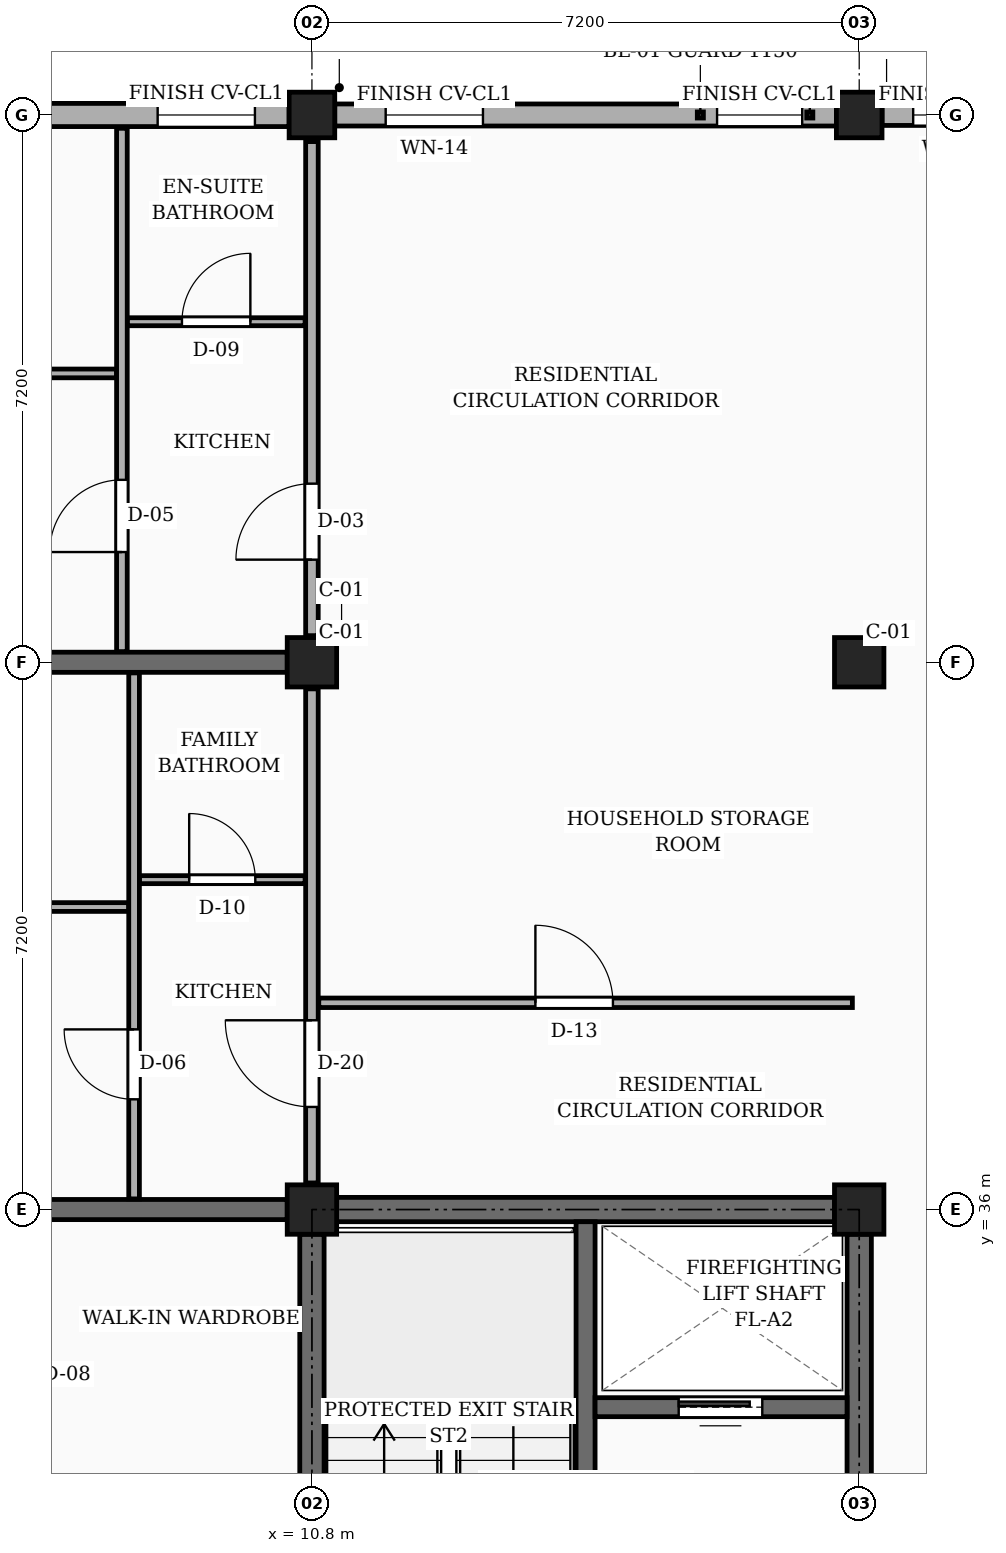
"""IFC4 building model, lengths in metres.
Left out: names, types, materials, properties, quantities, classifications, styles, units other than length and angle.
Written with IfcOpenShell. Run it as: python <this file> out.ifc"""

import sys

from ifc_helpers import new_model, si_unit, direction, frame, frame_2d, origin, origin_2d, place, context, subcontext, project, spatial, rectangle, extrude, element, fill, save


model = new_model("IFC4")
c1 = context("Model", 3, precision=1e-05, world=origin(), true_north=direction((0.0, 1.0)))
c2 = subcontext(c1, "Body", "Model", "MODEL_VIEW")
j1 = project(units=[si_unit("LENGTHUNIT", "METRE"), si_unit("PLANEANGLEUNIT", "RADIAN")], contexts=[c1])
p1 = place(None, origin())
s1 = spatial("IfcSite", under=j1, at=p1, CompositionType="ELEMENT")
p2 = place(p1, origin())
s2 = spatial("IfcBuilding", under=s1, at=p2, CompositionType="ELEMENT")
p3 = place(p2, frame((0.0, 0.0, 7.65)))
s3 = spatial("IfcBuildingStorey", under=s2, at=p3, CompositionType="ELEMENT", Elevation=7.65)
for number, where, z_axis, x_axis in (
    (1, (10.8, 36.0, 0.0), (0.0, 0.0, 1.0), (1.0, 0.0, 0.0)),
    (2, (10.8, 43.2, 0.0), (0.0, 0.0, 1.0), (1.0, 0.0, 0.0)),
):
    element("IfcColumn", number, at=place(p3, frame(where, z_axis=z_axis, x_axis=x_axis)), inside=s3, PredefinedType="COLUMN", context=c2, shape_type="SweptSolid", body=[
        extrude(rectangle(XDim=0.65, YDim=0.65, at=origin_2d()), origin(), (0.0, 0.0, 1.0), 3.15),
    ])
p4 = place(p3, frame((10.8, 50.4, 0.0), z_axis=(0.0, 0.0, 1.0), x_axis=(1.0, 0.0, 0.0)))
e3 = element("IfcColumn", 3, at=p4, inside=s3, PredefinedType="COLUMN", context=c2, shape_type="SweptSolid", body=[
    extrude(rectangle(XDim=0.6, YDim=0.6, at=origin_2d()), origin(), (0.0, 0.0, 1.0), 3.15),
])
for number, where, z_axis, x_axis in (
    (4, (18.0, 36.0, 0.0), (0.0, 0.0, 1.0), (1.0, 0.0, 0.0)),
    (5, (18.0, 43.2, 0.0), (0.0, 0.0, 1.0), (1.0, 0.0, 0.0)),
):
    element("IfcColumn", number, at=place(p3, frame(where, z_axis=z_axis, x_axis=x_axis)), inside=s3, PredefinedType="COLUMN", context=c2, shape_type="SweptSolid", body=[
        extrude(rectangle(XDim=0.65, YDim=0.65, at=origin_2d()), origin(), (0.0, 0.0, 1.0), 3.15),
    ])
p5 = place(p3, frame((18.0, 50.4, 0.0), z_axis=(0.0, 0.0, 1.0), x_axis=(1.0, 0.0, 0.0)))
e6 = element("IfcColumn", 6, at=p5, inside=s3, PredefinedType="COLUMN", context=c2, shape_type="SweptSolid", body=[
    extrude(rectangle(XDim=0.6, YDim=0.6, at=origin_2d()), origin(), (0.0, 0.0, 1.0), 3.15),
])
for number, where, z_axis, x_axis in (
    (7, (3.9, 36.0, 0.0), (0.0, 0.0, 1.0), (1.0, 0.0, 0.0)),
    (8, (3.9, 43.2, 0.0), (0.0, 0.0, 1.0), (1.0, 0.0, 0.0)),
):
    element("IfcWall", number, at=place(p3, frame(where, z_axis=z_axis, x_axis=x_axis)), inside=s3, PredefinedType="SOLIDWALL", context=c2, shape_type="SweptSolid", body=[
        extrude(rectangle(XDim=6.575, YDim=0.265, at=frame_2d((3.288, 0.0))), origin(), (0.0, 0.0, 1.0), 2.17),
    ])
p6 = place(p3, frame((24.9, 50.4, 0.0), z_axis=(0.0, 0.0, 1.0), x_axis=(-1.0, 0.0, 0.0)))
e9 = element("IfcWall", 9, at=p6, inside=s3, PredefinedType="SOLIDWALL", context=c2, shape_type="SweptSolid", body=[
    extrude(rectangle(XDim=6.6, YDim=0.275, at=frame_2d((3.3, 0.0))), origin(), (0.0, 0.0, 1.0), 2.44),
])
p7 = place(p6, frame((2.115, 0.0, 0.78)))
e10 = element("IfcOpeningElement", 10, at=p7, cuts=e9, PredefinedType="OPENING", context=c2, shape_type="SweptSolid", body=[
    extrude(rectangle(XDim=0.96, YDim=1.26, at=frame_2d((0.48, 0.63))), frame((0.0, 0.147, 0.0), z_axis=(0.0, -1.0, 0.0), x_axis=(1.0, 0.0, 0.0)), (0.0, 0.0, 1.0), 0.295),
])
p8 = place(p6, frame((5.07, 0.0, 0.78)))
e11 = element("IfcOpeningElement", 11, at=p8, cuts=e9, PredefinedType="OPENING", context=c2, shape_type="SweptSolid", body=[
    extrude(rectangle(XDim=1.12, YDim=1.26, at=frame_2d((0.56, 0.63))), frame((0.0, 0.147, 0.0), z_axis=(0.0, -1.0, 0.0), x_axis=(1.0, 0.0, 0.0)), (0.0, 0.0, 1.0), 0.295),
])
p9 = place(p3, frame((17.7, 50.4, 0.0), z_axis=(0.0, 0.0, 1.0), x_axis=(-1.0, 0.0, 0.0)))
e12 = element("IfcWall", 12, at=p9, inside=s3, PredefinedType="SOLIDWALL", context=c2, shape_type="SweptSolid", body=[
    extrude(rectangle(XDim=6.6, YDim=0.29, at=frame_2d((3.3, 0.0))), origin(), (0.0, 0.0, 1.0), 2.44),
])
p10 = place(p9, frame((0.45, 0.0, 0.78)))
e13 = element("IfcOpeningElement", 13, at=p10, cuts=e12, PredefinedType="OPENING", context=c2, shape_type="SweptSolid", body=[
    extrude(rectangle(XDim=1.12, YDim=1.26, at=frame_2d((0.56, 0.63))), frame((0.0, 0.155, 0.0), z_axis=(0.0, -1.0, 0.0), x_axis=(1.0, 0.0, 0.0)), (0.0, 0.0, 1.0), 0.31),
])
p11 = place(p9, frame((4.65, 0.0, 0.78)))
e14 = element("IfcOpeningElement", 14, at=p11, cuts=e12, PredefinedType="OPENING", context=c2, shape_type="SweptSolid", body=[
    extrude(rectangle(XDim=1.28, YDim=1.26, at=frame_2d((0.64, 0.63))), frame((0.0, 0.155, 0.0), z_axis=(0.0, -1.0, 0.0), x_axis=(1.0, 0.0, 0.0)), (0.0, 0.0, 1.0), 0.31),
])
p12 = place(p3, frame((10.5, 50.4, 0.0), z_axis=(0.0, 0.0, 1.0), x_axis=(-1.0, 0.0, 0.0)))
e15 = element("IfcWall", 15, at=p12, inside=s3, PredefinedType="SOLIDWALL", context=c2, shape_type="SweptSolid", body=[
    extrude(rectangle(XDim=6.6, YDim=0.305, at=frame_2d((3.3, 0.0))), origin(), (0.0, 0.0, 1.0), 2.44),
])
p13 = place(p12, frame((0.45, 0.0, 0.78)))
e16 = element("IfcOpeningElement", 16, at=p13, cuts=e15, PredefinedType="OPENING", context=c2, shape_type="SweptSolid", body=[
    extrude(rectangle(XDim=1.28, YDim=1.26, at=frame_2d((0.64, 0.63))), frame((0.0, 0.163, 0.0), z_axis=(0.0, -1.0, 0.0), x_axis=(1.0, 0.0, 0.0)), (0.0, 0.0, 1.0), 0.325),
])
p14 = place(p12, frame((4.65, 0.0, 0.78)))
e17 = element("IfcOpeningElement", 17, at=p14, cuts=e15, PredefinedType="OPENING", context=c2, shape_type="SweptSolid", body=[
    extrude(rectangle(XDim=1.44, YDim=1.26, at=frame_2d((0.72, 0.63))), frame((0.0, 0.163, 0.0), z_axis=(0.0, -1.0, 0.0), x_axis=(1.0, 0.0, 0.0)), (0.0, 0.0, 1.0), 0.325),
])
for number, where, z_axis, x_axis in (
    (18, (10.8, 29.125, 0.0), (0.0, 0.0, 1.0), (0.0, 1.0, 0.0)),
    (19, (11.125, 36.0, 0.0), (0.0, 0.0, 1.0), (1.0, 0.0, 0.0)),
):
    element("IfcWall", number, at=place(p3, frame(where, z_axis=z_axis, x_axis=x_axis)), inside=s3, PredefinedType="SHEAR", context=c2, shape_type="SweptSolid", body=[
        extrude(rectangle(XDim=6.55, YDim=0.32, at=frame_2d((3.275, 0.0))), origin(), (0.0, 0.0, 1.0), 2.87),
    ])
p15 = place(p3, frame((18.0, 29.125, 0.0), z_axis=(0.0, 0.0, 1.0), x_axis=(0.0, 1.0, 0.0)))
e20 = element("IfcWall", 20, at=p15, inside=s3, PredefinedType="SHEAR", context=c2, shape_type="SweptSolid", body=[
    extrude(rectangle(XDim=6.55, YDim=0.32, at=frame_2d((3.275, 0.0))), origin(), (0.0, 0.0, 1.0), 2.87),
])
p16 = place(p15, frame((1.5, 0.0, 0.0)))
e21 = element("IfcOpeningElement", 21, at=p16, cuts=e20, PredefinedType="OPENING", context=c2, shape_type="SweptSolid", body=[
    extrude(rectangle(XDim=1.1, YDim=2.15, at=frame_2d((0.55, 1.075))), frame((0.0, 0.17, 0.0), z_axis=(0.0, -1.0, 0.0), x_axis=(1.0, 0.0, 0.0)), (0.0, 0.0, 1.0), 0.34),
])
p17 = place(p3, frame((14.4, 28.96, 0.0), z_axis=(0.0, 0.0, 1.0), x_axis=(0.0, 1.0, 0.0)))
e22 = element("IfcWall", 22, at=p17, inside=s3, PredefinedType="SHEAR", context=c2, shape_type="SweptSolid", body=[
    extrude(rectangle(XDim=6.88, YDim=0.25, at=frame_2d((3.44, 0.0))), origin(), (0.0, 0.0, 1.0), 2.87),
])
p18 = place(p17, frame((0.44, 0.0, 0.0)))
e23 = element("IfcOpeningElement", 23, at=p18, cuts=e22, PredefinedType="OPENING", context=c2, shape_type="SweptSolid", body=[
    extrude(rectangle(XDim=1.05, YDim=2.15, at=frame_2d((0.525, 1.075))), frame((0.0, 0.135, 0.0), z_axis=(0.0, -1.0, 0.0), x_axis=(1.0, 0.0, 0.0)), (0.0, 0.0, 1.0), 0.27),
])
p19 = place(p3, frame((14.525, 33.4, 0.0), z_axis=(0.0, 0.0, 1.0), x_axis=(1.0, 0.0, 0.0)))
e24 = element("IfcWall", 24, at=p19, inside=s3, PredefinedType="SHEAR", context=c2, shape_type="SweptSolid", body=[
    extrude(rectangle(XDim=3.315, YDim=0.25, at=frame_2d((1.658, 0.0))), origin(), (0.0, 0.0, 1.0), 2.87),
])
p20 = place(p19, frame((1.1, 0.0, 0.0)))
e25 = element("IfcOpeningElement", 25, at=p20, cuts=e24, PredefinedType="OPENING", context=c2, shape_type="SweptSolid", body=[
    extrude(rectangle(XDim=1.1, YDim=2.2, at=frame_2d((0.55, 1.1))), frame((0.0, 0.135, 0.0), z_axis=(0.0, -1.0, 0.0), x_axis=(1.0, 0.0, 0.0)), (0.0, 0.0, 1.0), 0.27),
])
p21 = place(p3, frame((10.8, 36.35, 0.0), z_axis=(0.0, 0.0, 1.0), x_axis=(0.0, 1.0, 0.0)))
e26 = element("IfcWall", 26, at=p21, inside=s3, PredefinedType="PARTITIONING", context=c2, shape_type="SweptSolid", body=[
    extrude(rectangle(XDim=6.5, YDim=0.165, at=frame_2d((3.25, 0.0))), origin(), (0.0, 0.0, 1.0), 2.22),
])
p22 = place(p21, frame((1.0, 0.0, 0.0)))
e27 = element("IfcOpeningElement", 27, at=p22, cuts=e26, PredefinedType="OPENING", context=c2, shape_type="SweptSolid", body=[
    extrude(rectangle(XDim=1.14, YDim=2.18, at=frame_2d((0.57, 1.09))), frame((0.0, 0.093, 0.0), z_axis=(0.0, -1.0, 0.0), x_axis=(1.0, 0.0, 0.0)), (0.0, 0.0, 1.0), 0.185),
])
p23 = place(p3, frame((10.8, 43.55, 0.0), z_axis=(0.0, 0.0, 1.0), x_axis=(0.0, 1.0, 0.0)))
e28 = element("IfcWall", 28, at=p23, inside=s3, PredefinedType="PARTITIONING", context=c2, shape_type="SweptSolid", body=[
    extrude(rectangle(XDim=6.5, YDim=0.165, at=frame_2d((3.25, 0.0))), origin(), (0.0, 0.0, 1.0), 2.22),
])
p24 = place(p23, frame((1.0, 0.0, 0.0)))
e29 = element("IfcOpeningElement", 29, at=p24, cuts=e28, PredefinedType="OPENING", context=c2, shape_type="SweptSolid", body=[
    extrude(rectangle(XDim=1.0, YDim=2.15, at=frame_2d((0.5, 1.075))), frame((0.0, 0.093, 0.0), z_axis=(0.0, -1.0, 0.0), x_axis=(1.0, 0.0, 0.0)), (0.0, 0.0, 1.0), 0.185),
])
p25 = place(p3, frame((10.89, 38.72, 0.0), z_axis=(0.0, 0.0, 1.0), x_axis=(1.0, 0.0, 0.0)))
e30 = element("IfcWall", 30, at=p25, inside=s3, PredefinedType="PARTITIONING", context=c2, shape_type="SweptSolid", body=[
    extrude(rectangle(XDim=7.02, YDim=0.125, at=frame_2d((3.51, 0.0))), origin(), (0.0, 0.0, 1.0), 2.305),
])
p26 = place(p25, frame((2.85, 0.0, 0.0)))
e31 = element("IfcOpeningElement", 31, at=p26, cuts=e30, PredefinedType="OPENING", context=c2, shape_type="SweptSolid", body=[
    extrude(rectangle(XDim=1.02, YDim=2.15, at=frame_2d((0.51, 1.075))), frame((0.0, 0.073, 0.0), z_axis=(0.0, -1.0, 0.0), x_axis=(1.0, 0.0, 0.0)), (0.0, 0.0, 1.0), 0.145),
])
p27 = place(p3, frame((3.775, 39.98, 0.0), z_axis=(0.0, 0.0, 1.0), x_axis=(1.0, 0.0, 0.0)))
e32 = element("IfcWall", 32, at=p27, inside=s3, PredefinedType="PARTITIONING", context=c2, shape_type="SweptSolid", body=[
    extrude(rectangle(XDim=4.615, YDim=0.115, at=frame_2d((2.308, 0.0))), origin(), (0.0, 0.0, 1.0), 2.305),
])
p28 = place(p27, frame((1.867, 0.0, 0.0)))
e33 = element("IfcOpeningElement", 33, at=p28, cuts=e32, PredefinedType="OPENING", context=c2, shape_type="SweptSolid", body=[
    extrude(rectangle(XDim=0.88, YDim=2.08, at=frame_2d((0.44, 1.04))), frame((0.0, 0.067, 0.0), z_axis=(0.0, -1.0, 0.0), x_axis=(1.0, 0.0, 0.0)), (0.0, 0.0, 1.0), 0.135),
])
p29 = place(p3, frame((8.53, 40.34, 0.0), z_axis=(0.0, 0.0, 1.0), x_axis=(1.0, 0.0, 0.0)))
e34 = element("IfcWall", 34, at=p29, inside=s3, PredefinedType="PARTITIONING", context=c2, shape_type="SweptSolid", body=[
    extrude(rectangle(XDim=2.18, YDim=0.105, at=frame_2d((1.09, 0.0))), origin(), (0.0, 0.0, 1.0), 2.305),
])
p30 = place(p29, frame((0.655, 0.0, 0.0)))
e35 = element("IfcOpeningElement", 35, at=p30, cuts=e34, PredefinedType="OPENING", context=c2, shape_type="SweptSolid", body=[
    extrude(rectangle(XDim=0.87, YDim=2.05, at=frame_2d((0.435, 1.025))), frame((0.0, 0.062, 0.0), z_axis=(0.0, -1.0, 0.0), x_axis=(1.0, 0.0, 0.0)), (0.0, 0.0, 1.0), 0.125),
])
p31 = place(p3, frame((8.46, 36.14, 0.0), z_axis=(0.0, 0.0, 1.0), x_axis=(0.0, 1.0, 0.0)))
e36 = element("IfcWall", 36, at=p31, inside=s3, PredefinedType="PARTITIONING", context=c2, shape_type="SweptSolid", body=[
    extrude(rectangle(XDim=6.92, YDim=0.14, at=frame_2d((3.46, 0.0))), origin(), (0.0, 0.0, 1.0), 2.305),
])
p32 = place(p31, frame((1.31, 0.0, 0.0)))
e37 = element("IfcOpeningElement", 37, at=p32, cuts=e36, PredefinedType="OPENING", context=c2, shape_type="SweptSolid", body=[
    extrude(rectangle(XDim=0.92, YDim=2.1, at=frame_2d((0.46, 1.05))), frame((0.0, 0.08, 0.0), z_axis=(0.0, -1.0, 0.0), x_axis=(1.0, 0.0, 0.0)), (0.0, 0.0, 1.0), 0.16),
])
p33 = place(p3, frame((3.775, 47.0, 0.0), z_axis=(0.0, 0.0, 1.0), x_axis=(1.0, 0.0, 0.0)))
e38 = element("IfcWall", 38, at=p33, inside=s3, PredefinedType="PARTITIONING", context=c2, shape_type="SweptSolid", body=[
    extrude(rectangle(XDim=4.455, YDim=0.115, at=frame_2d((2.228, 0.0))), origin(), (0.0, 0.0, 1.0), 2.305),
])
p34 = place(p33, frame((1.778, 0.0, 0.0)))
e39 = element("IfcOpeningElement", 39, at=p34, cuts=e38, PredefinedType="OPENING", context=c2, shape_type="SweptSolid", body=[
    extrude(rectangle(XDim=0.9, YDim=2.1, at=frame_2d((0.45, 1.05))), frame((0.0, 0.067, 0.0), z_axis=(0.0, -1.0, 0.0), x_axis=(1.0, 0.0, 0.0)), (0.0, 0.0, 1.0), 0.135),
])
p35 = place(p3, frame((8.37, 47.68, 0.0), z_axis=(0.0, 0.0, 1.0), x_axis=(1.0, 0.0, 0.0)))
e40 = element("IfcWall", 40, at=p35, inside=s3, PredefinedType="PARTITIONING", context=c2, shape_type="SweptSolid", body=[
    extrude(rectangle(XDim=2.34, YDim=0.105, at=frame_2d((1.17, 0.0))), origin(), (0.0, 0.0, 1.0), 2.305),
])
p36 = place(p35, frame((0.72, 0.0, 0.0)))
e41 = element("IfcOpeningElement", 41, at=p36, cuts=e40, PredefinedType="OPENING", context=c2, shape_type="SweptSolid", body=[
    extrude(rectangle(XDim=0.9, YDim=2.05, at=frame_2d((0.45, 1.025))), frame((0.0, 0.062, 0.0), z_axis=(0.0, -1.0, 0.0), x_axis=(1.0, 0.0, 0.0)), (0.0, 0.0, 1.0), 0.125),
])
p37 = place(p3, frame((8.3, 43.34, 0.0), z_axis=(0.0, 0.0, 1.0), x_axis=(0.0, 1.0, 0.0)))
e42 = element("IfcWall", 42, at=p37, inside=s3, PredefinedType="PARTITIONING", context=c2, shape_type="SweptSolid", body=[
    extrude(rectangle(XDim=6.885, YDim=0.14, at=frame_2d((3.442, 0.0))), origin(), (0.0, 0.0, 1.0), 2.305),
])
p38 = place(p37, frame((1.31, 0.0, 0.0)))
e43 = element("IfcOpeningElement", 43, at=p38, cuts=e42, PredefinedType="OPENING", context=c2, shape_type="SweptSolid", body=[
    extrude(rectangle(XDim=0.95, YDim=2.1, at=frame_2d((0.475, 1.05))), frame((0.0, 0.08, 0.0), z_axis=(0.0, -1.0, 0.0), x_axis=(1.0, 0.0, 0.0)), (0.0, 0.0, 1.0), 0.16),
])
p39 = place(p8, origin())
e44 = element("IfcWindow", 44, at=p39, inside=s3, PartitioningType="SINGLE_PANEL", PredefinedType="WINDOW", context=c2, shape_type="SweptSolid", body=[
    extrude(rectangle(XDim=1.12, YDim=1.26, at=frame_2d((0.56, 0.63))), frame((0.0, 0.03, 0.0), z_axis=(0.0, -1.0, 0.0), x_axis=(1.0, 0.0, 0.0)), (0.0, 0.0, 1.0), 0.06),
])
fill(e11, e44)
p40 = place(p10, origin())
e45 = element("IfcWindow", 45, at=p40, inside=s3, PartitioningType="SINGLE_PANEL", PredefinedType="WINDOW", context=c2, shape_type="SweptSolid", body=[
    extrude(rectangle(XDim=1.12, YDim=1.26, at=frame_2d((0.56, 0.63))), frame((0.0, 0.03, 0.0), z_axis=(0.0, -1.0, 0.0), x_axis=(1.0, 0.0, 0.0)), (0.0, 0.0, 1.0), 0.06),
])
fill(e13, e45)
p41 = place(p11, origin())
e46 = element("IfcWindow", 46, at=p41, inside=s3, PartitioningType="SINGLE_PANEL", PredefinedType="WINDOW", context=c2, shape_type="SweptSolid", body=[
    extrude(rectangle(XDim=1.28, YDim=1.26, at=frame_2d((0.64, 0.63))), frame((0.0, 0.03, 0.0), z_axis=(0.0, -1.0, 0.0), x_axis=(1.0, 0.0, 0.0)), (0.0, 0.0, 1.0), 0.06),
])
fill(e14, e46)
p42 = place(p13, origin())
e47 = element("IfcWindow", 47, at=p42, inside=s3, PartitioningType="SINGLE_PANEL", PredefinedType="WINDOW", context=c2, shape_type="SweptSolid", body=[
    extrude(rectangle(XDim=1.28, YDim=1.26, at=frame_2d((0.64, 0.63))), frame((0.0, 0.03, 0.0), z_axis=(0.0, -1.0, 0.0), x_axis=(1.0, 0.0, 0.0)), (0.0, 0.0, 1.0), 0.06),
])
fill(e16, e47)
p43 = place(p20, origin())
e48 = element("IfcDoor", 48, at=p43, inside=s3, OperationType="SLIDING_TO_LEFT", PredefinedType="DOOR", context=c2, shape_type="SweptSolid", body=[
    extrude(rectangle(XDim=1.1, YDim=2.2, at=frame_2d((0.55, 1.1))), frame((0.0, 0.025, 0.0), z_axis=(0.0, -1.0, 0.0), x_axis=(1.0, 0.0, 0.0)), (0.0, 0.0, 1.0), 0.05),
])
fill(e25, e48)
p44 = place(p22, origin())
e49 = element("IfcDoor", 49, at=p44, inside=s3, OperationType="SINGLE_SWING_RIGHT", PredefinedType="DOOR", context=c2, shape_type="SweptSolid", body=[
    extrude(rectangle(XDim=1.14, YDim=2.18, at=frame_2d((0.57, 1.09))), frame((0.0, 0.025, 0.0), z_axis=(0.0, -1.0, 0.0), x_axis=(1.0, 0.0, 0.0)), (0.0, 0.0, 1.0), 0.05),
])
fill(e27, e49)
p45 = place(p24, origin())
e50 = element("IfcDoor", 50, at=p45, inside=s3, OperationType="SINGLE_SWING_LEFT", PredefinedType="DOOR", context=c2, shape_type="SweptSolid", body=[
    extrude(rectangle(XDim=1.0, YDim=2.15, at=frame_2d((0.5, 1.075))), frame((0.0, 0.025, 0.0), z_axis=(0.0, -1.0, 0.0), x_axis=(1.0, 0.0, 0.0)), (0.0, 0.0, 1.0), 0.05),
])
fill(e29, e50)
p46 = place(p26, origin())
e51 = element("IfcDoor", 51, at=p46, inside=s3, OperationType="SINGLE_SWING_LEFT", PredefinedType="DOOR", context=c2, shape_type="SweptSolid", body=[
    extrude(rectangle(XDim=1.02, YDim=2.15, at=frame_2d((0.51, 1.075))), frame((0.0, 0.025, 0.0), z_axis=(0.0, -1.0, 0.0), x_axis=(1.0, 0.0, 0.0)), (0.0, 0.0, 1.0), 0.05),
])
fill(e31, e51)
p47 = place(p30, origin())
e52 = element("IfcDoor", 52, at=p47, inside=s3, OperationType="SINGLE_SWING_LEFT", PredefinedType="DOOR", context=c2, shape_type="SweptSolid", body=[
    extrude(rectangle(XDim=0.87, YDim=2.05, at=frame_2d((0.435, 1.025))), frame((0.0, 0.025, 0.0), z_axis=(0.0, -1.0, 0.0), x_axis=(1.0, 0.0, 0.0)), (0.0, 0.0, 1.0), 0.05),
])
fill(e35, e52)
p48 = place(p32, origin())
e53 = element("IfcDoor", 53, at=p48, inside=s3, OperationType="SINGLE_SWING_RIGHT", PredefinedType="DOOR", context=c2, shape_type="SweptSolid", body=[
    extrude(rectangle(XDim=0.92, YDim=2.1, at=frame_2d((0.46, 1.05))), frame((0.0, 0.025, 0.0), z_axis=(0.0, -1.0, 0.0), x_axis=(1.0, 0.0, 0.0)), (0.0, 0.0, 1.0), 0.05),
])
fill(e37, e53)
p49 = place(p36, origin())
e54 = element("IfcDoor", 54, at=p49, inside=s3, OperationType="SINGLE_SWING_RIGHT", PredefinedType="DOOR", context=c2, shape_type="SweptSolid", body=[
    extrude(rectangle(XDim=0.9, YDim=2.05, at=frame_2d((0.45, 1.025))), frame((0.0, 0.025, 0.0), z_axis=(0.0, -1.0, 0.0), x_axis=(1.0, 0.0, 0.0)), (0.0, 0.0, 1.0), 0.05),
])
fill(e41, e54)
p50 = place(p38, origin())
e55 = element("IfcDoor", 55, at=p50, inside=s3, OperationType="SINGLE_SWING_LEFT", PredefinedType="DOOR", context=c2, shape_type="SweptSolid", body=[
    extrude(rectangle(XDim=0.95, YDim=2.1, at=frame_2d((0.475, 1.05))), frame((0.0, 0.025, 0.0), z_axis=(0.0, -1.0, 0.0), x_axis=(1.0, 0.0, 0.0)), (0.0, 0.0, 1.0), 0.05),
])
fill(e43, e55)
save(model, sys.argv[1])
